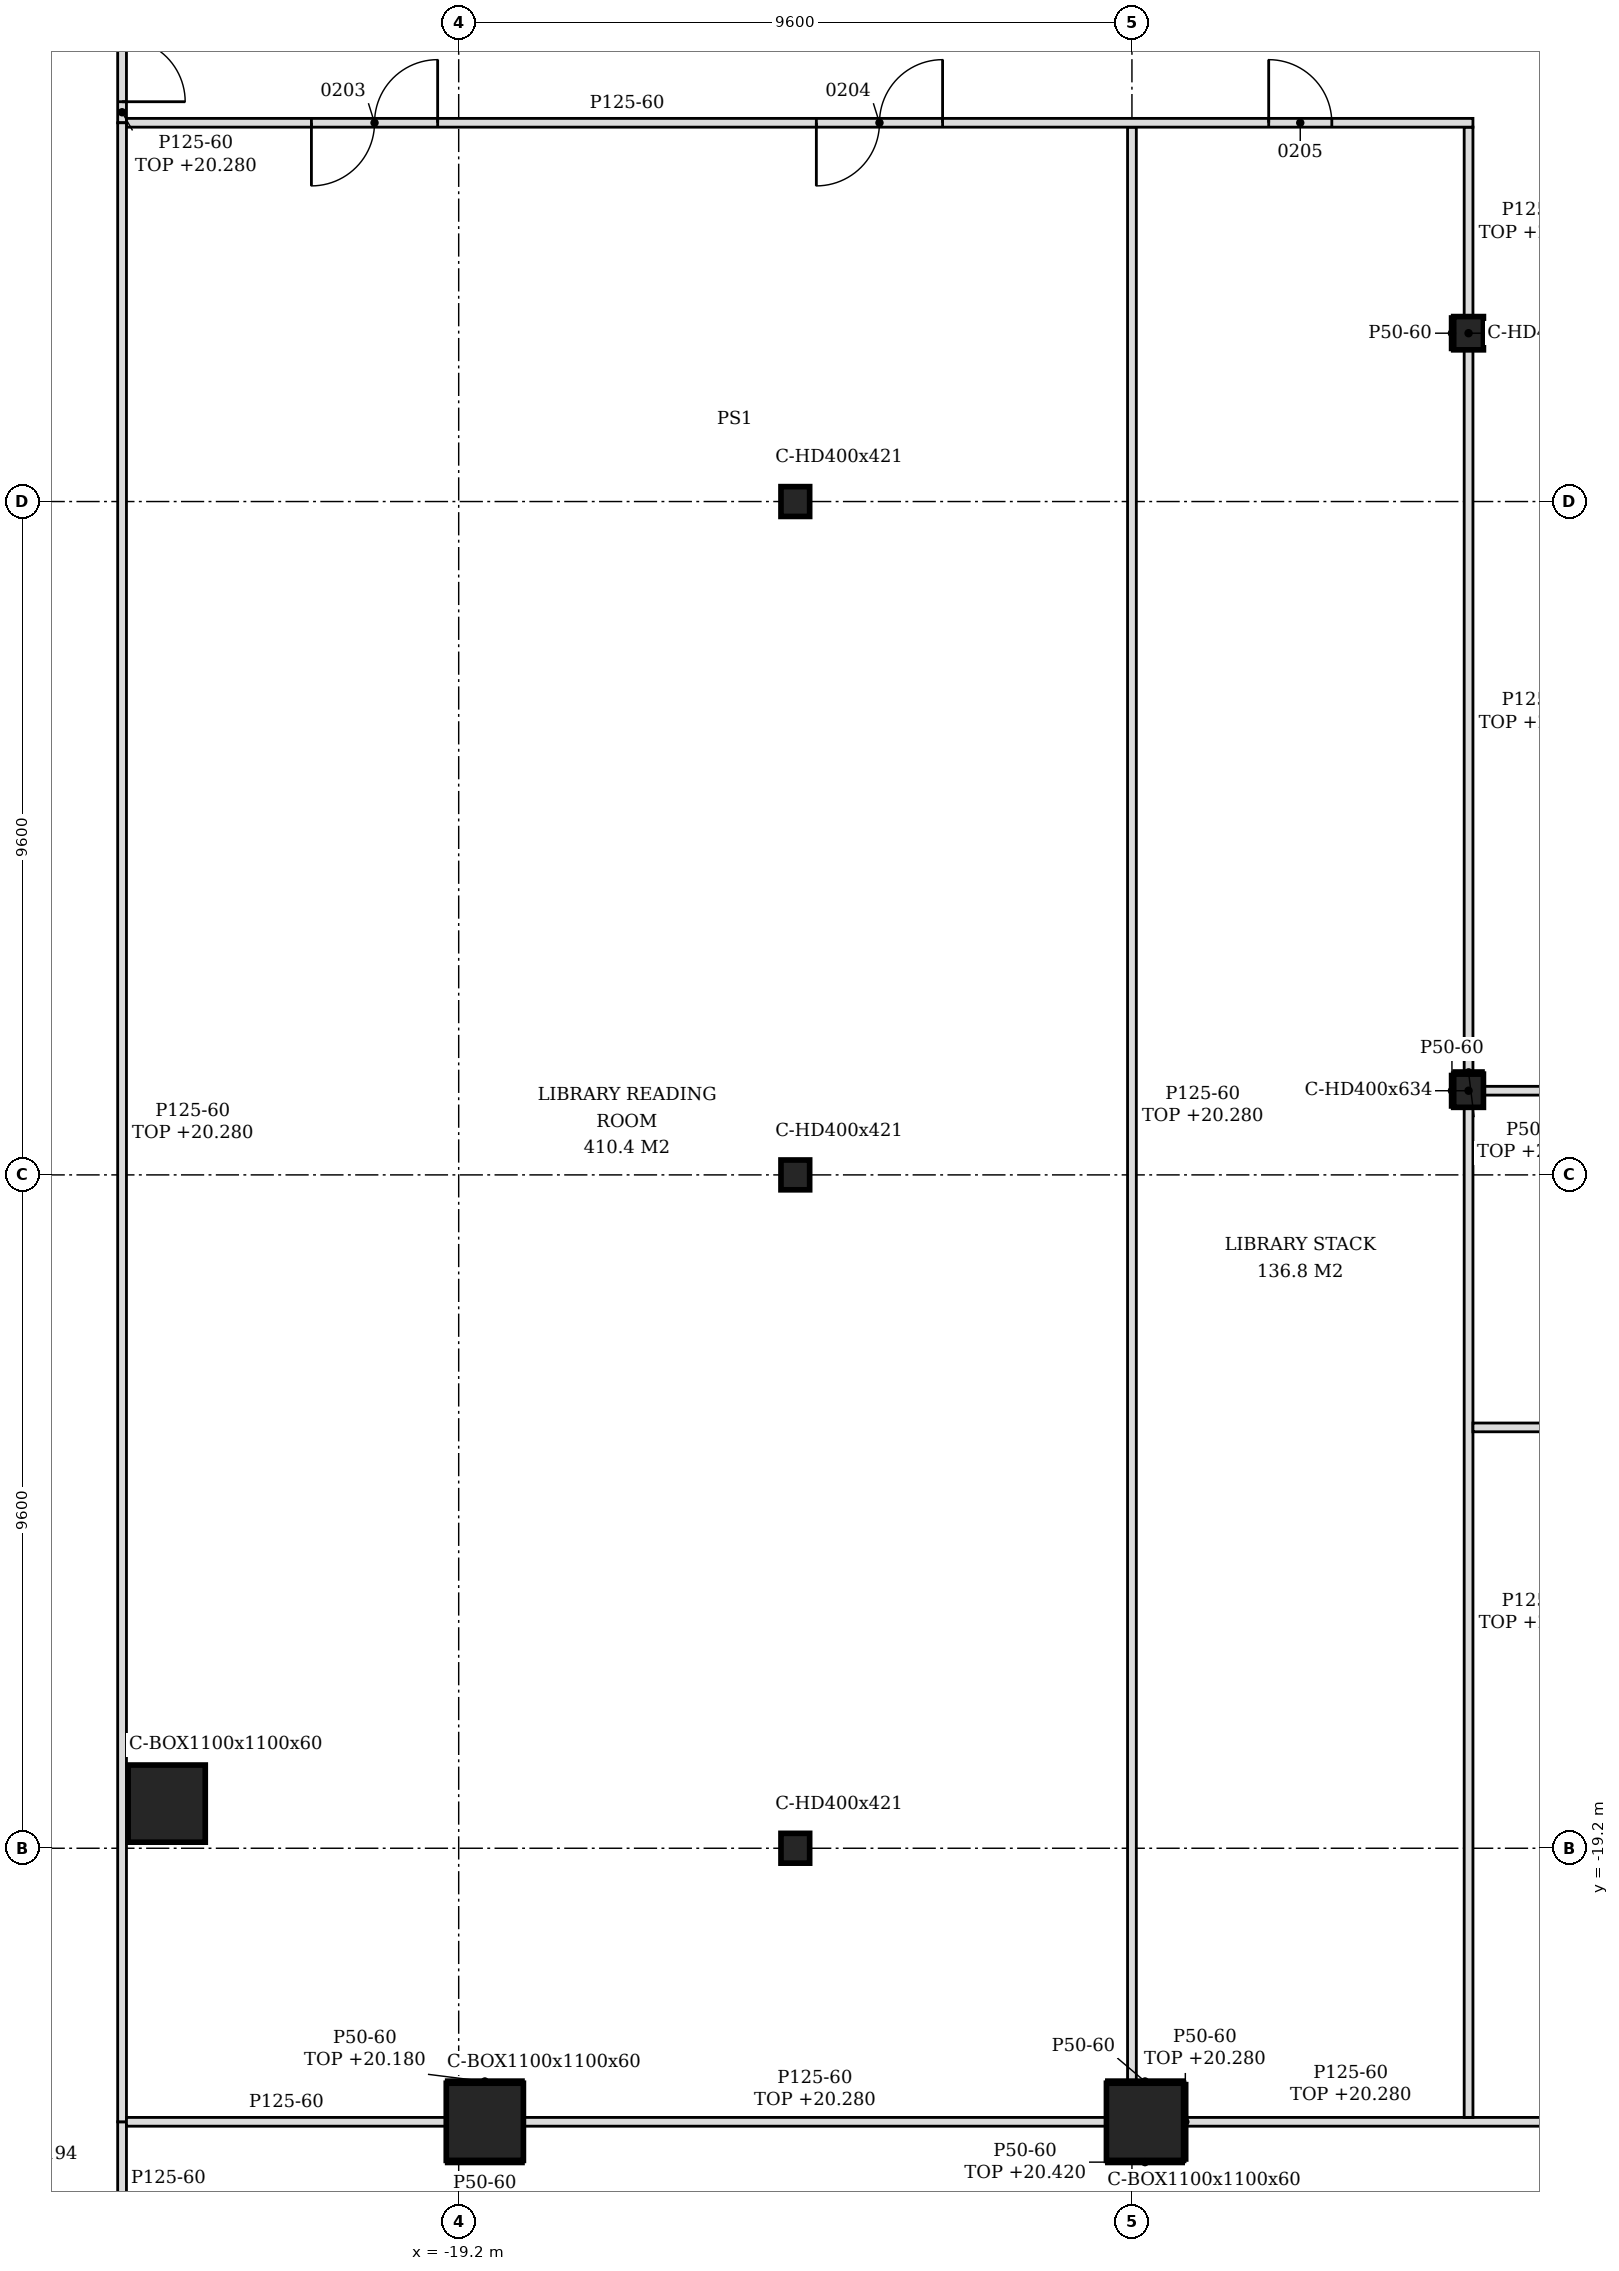
"""IFC4 building model, lengths in metres.
Left out: names, types, materials, properties, quantities, classifications, styles, units other than length and angle.
Written with IfcOpenShell. Run it as: python <this file> out.ifc"""

import sys

from ifc_helpers import new_model, si_unit, direction, frame, frame_2d, origin, origin_2d, place, context, subcontext, project, spatial, polyline, rectangle, hollow_rectangle, i_section, outline, extrude, element, fill, save


model = new_model("IFC4")
c1 = context("Model", 3, precision=1e-05, world=origin(), true_north=direction((0.0, 1.0)))
c2 = subcontext(c1, "Body", "Model", "MODEL_VIEW")
j1 = project(units=[si_unit("LENGTHUNIT", "METRE"), si_unit("PLANEANGLEUNIT", "RADIAN")], contexts=[c1])
p1 = place(None, origin())
s1 = spatial("IfcSite", under=j1, at=p1, CompositionType="ELEMENT")
p2 = place(p1, origin())
s2 = spatial("IfcBuilding", under=s1, at=p2, CompositionType="ELEMENT")
p3 = place(p2, frame((0.0, 0.0, 15.0)))
s3 = spatial("IfcBuildingStorey", under=s2, at=p3, CompositionType="ELEMENT", Elevation=15.0)
for number, where, z_axis, x_axis in (
    (1, (-18.827, -23.1, -0.2), (0.0, 0.0, 1.0), (1.0, 0.0, 0.0)),
    (2, (-9.414, -23.1, -0.2), (0.0, 0.0, 1.0), (1.0, 0.0, 0.0)),
    (3, (-23.364, -18.564, -0.2), (0.0, 0.0, 1.0), (1.0, 0.0, 0.0)),
):
    element("IfcColumn", number, at=place(p3, frame(where, z_axis=z_axis, x_axis=x_axis)), inside=s3, PredefinedType="COLUMN", context=c2, shape_type="SweptSolid", body=[
        extrude(hollow_rectangle(XDim=1.1, YDim=1.1, WallThickness=0.06, at=origin_2d()), origin(), (0.0, 0.0, 1.0), 6.0),
    ])
for number, where, z_axis, x_axis in (
    (4, (-4.8, -8.4, -0.2), (0.0, 0.0, 1.0), (1.0, 0.0, 0.0)),
    (5, (-4.8, 2.4, -0.2), (0.0, 0.0, 1.0), (1.0, 0.0, 0.0)),
):
    element("IfcColumn", number, at=place(p3, frame(where, z_axis=z_axis, x_axis=x_axis)), inside=s3, PredefinedType="COLUMN", context=c2, shape_type="SweptSolid", body=[
        extrude(i_section(OverallWidth=0.424, OverallDepth=0.474, WebThickness=0.048, FlangeThickness=0.077, FilletRadius=0.015, at=origin_2d()), origin(), (0.0, 0.0, 1.0), 6.0),
    ])
for number, where, z_axis, x_axis in (
    (6, (-14.4, -19.2, -0.2), (0.0, 0.0, 1.0), (1.0, 0.0, 0.0)),
    (7, (-14.4, -9.6, -0.2), (0.0, 0.0, 1.0), (1.0, 0.0, 0.0)),
    (8, (-14.4, 0.0, -0.2), (0.0, 0.0, 1.0), (1.0, 0.0, 0.0)),
):
    element("IfcColumn", number, at=place(p3, frame(where, z_axis=z_axis, x_axis=x_axis)), inside=s3, PredefinedType="COLUMN", context=c2, shape_type="SweptSolid", body=[
        extrude(i_section(OverallWidth=0.409, OverallDepth=0.425, WebThickness=0.033, FlangeThickness=0.052, FilletRadius=0.015, at=origin_2d()), origin(), (0.0, 0.0, 1.0), 6.0),
    ])
p4 = place(p3, frame((-24.0, -24.7, 0.0), z_axis=(0.0, 0.0, 1.0), x_axis=(0.0, 1.0, 0.0)))
e9 = element("IfcWall", 9, at=p4, inside=s3, PredefinedType="PARTITIONING", context=c2, shape_type="SweptSolid", body=[
    extrude(rectangle(XDim=1.6, YDim=0.125, at=frame_2d((0.8, 0.0))), origin(), (0.0, 0.0, 1.0), 5.8),
])
p5 = place(p3, frame((-24.0, -23.1, 0.0), z_axis=(0.0, 0.0, 1.0), x_axis=(0.0, 1.0, 0.0)))
e10 = element("IfcWall", 10, at=p5, inside=s3, PredefinedType="PARTITIONING", context=c2, shape_type="SweptSolid", body=[
    extrude(outline(polyline([(0.0, 0.0), (28.5, 0.0), (28.5, 5.28), (23.25, 5.28), (23.248, 5.08), (22.95, 5.08), (22.948, 5.28), (13.65, 5.28), (13.648, 5.08), (13.35, 5.08), (13.348, 5.28), (4.05, 5.28), (4.048, 5.18), (3.75, 5.18), (3.748, 5.28), (0.0, 5.28), (0.0, 0.0)])), frame((0.0, 0.062, 0.0), z_axis=(0.0, -1.0, 0.0), x_axis=(1.0, 0.0, 0.0)), (0.0, 0.0, 1.0), 0.125),
])
p6 = place(p3, frame((-23.938, -23.1, 0.0), z_axis=(0.0, 0.0, 1.0), x_axis=(1.0, 0.0, 0.0)))
e11 = element("IfcWall", 11, at=p6, inside=s3, PredefinedType="PARTITIONING", context=c2, shape_type="SweptSolid", body=[
    extrude(rectangle(XDim=4.56, YDim=0.125, at=frame_2d((2.28, 0.0))), origin(), (0.0, 0.0, 1.0), 5.8),
])
p7 = place(p3, frame((-18.277, -23.1, 0.0), z_axis=(0.0, 0.0, 1.0), x_axis=(1.0, 0.0, 0.0)))
e12 = element("IfcWall", 12, at=p7, inside=s3, PredefinedType="PARTITIONING", context=c2, shape_type="SweptSolid", body=[
    extrude(rectangle(XDim=8.313, YDim=0.125, at=frame_2d((4.157, 0.0))), origin(), (0.0, 0.0, 1.0), 5.28),
])
p8 = place(p3, frame((-8.864, -23.1, 0.0), z_axis=(0.0, 0.0, 1.0), x_axis=(1.0, 0.0, 0.0)))
e13 = element("IfcWall", 13, at=p8, inside=s3, PredefinedType="PARTITIONING", context=c2, shape_type="SweptSolid", body=[
    extrude(rectangle(XDim=8.313, YDim=0.125, at=frame_2d((4.157, 0.0))), origin(), (0.0, 0.0, 1.0), 5.28),
])
p9 = place(p8, frame((6.614, 0.0, 0.0)))
e14 = element("IfcOpeningElement", 14, at=p9, cuts=e13, PredefinedType="OPENING", context=c2, shape_type="SweptSolid", body=[
    extrude(rectangle(XDim=0.9, YDim=2.1, at=frame_2d((0.45, 1.05))), frame((0.0, 0.073, 0.0), z_axis=(0.0, -1.0, 0.0), x_axis=(1.0, 0.0, 0.0)), (0.0, 0.0, 1.0), 0.145),
])
p10 = place(p3, frame((-4.8, -23.038, 0.0), z_axis=(0.0, 0.0, 1.0), x_axis=(0.0, 1.0, 0.0)))
e15 = element("IfcWall", 15, at=p10, inside=s3, PredefinedType="PARTITIONING", context=c2, shape_type="SweptSolid", body=[
    extrude(rectangle(XDim=14.401, YDim=0.125, at=frame_2d((7.2, 0.0))), origin(), (0.0, 0.0, 1.0), 5.18),
])
p11 = place(p3, frame((-9.6, -22.55, 0.0), z_axis=(0.0, 0.0, 1.0), x_axis=(0.0, 1.0, 0.0)))
e16 = element("IfcWall", 16, at=p11, inside=s3, PredefinedType="PARTITIONING", context=c2, shape_type="SweptSolid", body=[
    extrude(rectangle(XDim=27.887, YDim=0.125, at=frame_2d((13.944, 0.0))), origin(), (0.0, 0.0, 1.0), 5.28),
])
p12 = place(p3, frame((-4.738, -13.2, 0.0), z_axis=(0.0, 0.0, 1.0), x_axis=(1.0, 0.0, 0.0)))
e17 = element("IfcWall", 17, at=p12, inside=s3, PredefinedType="PARTITIONING", context=c2, shape_type="SweptSolid", body=[
    extrude(outline(polyline([(0.0, 0.0), (23.875, 0.0), (23.875, 5.18), (23.788, 5.18), (23.785, 5.8), (19.288, 5.8), (19.285, 5.18), (18.988, 5.18), (18.986, 5.8), (14.488, 5.8), (14.486, 5.18), (14.188, 5.18), (14.186, 5.8), (9.688, 5.8), (9.686, 5.18), (9.387, 5.18), (9.385, 5.8), (4.887, 5.8), (4.885, 5.18), (4.587, 5.18), (4.585, 5.8), (0.087, 5.8), (0.085, 5.18), (0.0, 5.18), (0.0, 0.0)])), frame((0.0, 0.062, 0.0), z_axis=(0.0, -1.0, 0.0), x_axis=(1.0, 0.0, 0.0)), (0.0, 0.0, 1.0), 0.125),
])
p13 = place(p3, frame((-4.588, -8.4, 0.0), z_axis=(0.0, 0.0, 1.0), x_axis=(1.0, 0.0, 0.0)))
e18 = element("IfcWall", 18, at=p13, inside=s3, PredefinedType="PARTITIONING", context=c2, shape_type="SweptSolid", body=[
    extrude(rectangle(XDim=11.576, YDim=0.125, at=frame_2d((5.788, 0.0))), origin(), (0.0, 0.0, 1.0), 5.18),
])
p14 = place(p13, frame((5.388, 0.0, 0.0)))
e19 = element("IfcOpeningElement", 19, at=p14, cuts=e18, PredefinedType="OPENING", context=c2, shape_type="SweptSolid", body=[
    extrude(rectangle(XDim=0.8, YDim=2.1, at=frame_2d((0.4, 1.05))), frame((0.0, 0.073, 0.0), z_axis=(0.0, -1.0, 0.0), x_axis=(1.0, 0.0, 0.0)), (0.0, 0.0, 1.0), 0.145),
])
p15 = place(p3, frame((-4.8, -8.163, 0.0), z_axis=(0.0, 0.0, 1.0), x_axis=(0.0, 1.0, 0.0)))
e20 = element("IfcWall", 20, at=p15, inside=s3, PredefinedType="PARTITIONING", context=c2, shape_type="SweptSolid", body=[
    extrude(rectangle(XDim=10.326, YDim=0.125, at=frame_2d((5.163, 0.0))), origin(), (0.0, 0.0, 1.0), 5.18),
])
p16 = place(p3, frame((-4.8, 2.637, 0.0), z_axis=(0.0, 0.0, 1.0), x_axis=(0.0, 1.0, 0.0)))
e21 = element("IfcWall", 21, at=p16, inside=s3, PredefinedType="PARTITIONING", context=c2, shape_type="SweptSolid", body=[
    extrude(rectangle(XDim=2.7, YDim=0.125, at=frame_2d((1.35, 0.0))), origin(), (0.0, 0.0, 1.0), 5.18),
])
p17 = place(p3, frame((-24.0, 5.4, 0.0), z_axis=(0.0, 0.0, 1.0), x_axis=(0.0, 1.0, 0.0)))
e22 = element("IfcWall", 22, at=p17, inside=s3, PredefinedType="PARTITIONING", context=c2, shape_type="SweptSolid", body=[
    extrude(rectangle(XDim=2.4, YDim=0.125, at=frame_2d((1.2, 0.0))), origin(), (0.0, 0.0, 1.0), 5.28),
])
p18 = place(p17, frame((0.3, 0.0, 0.0)))
e23 = element("IfcOpeningElement", 23, at=p18, cuts=e22, PredefinedType="OPENING", context=c2, shape_type="SweptSolid", body=[
    extrude(rectangle(XDim=1.8, YDim=2.1, at=frame_2d((0.9, 1.05))), frame((0.0, 0.073, 0.0), z_axis=(0.0, -1.0, 0.0), x_axis=(1.0, 0.0, 0.0)), (0.0, 0.0, 1.0), 0.145),
])
p19 = place(p3, frame((-23.938, 5.4, 0.0), z_axis=(0.0, 0.0, 1.0), x_axis=(1.0, 0.0, 0.0)))
e24 = element("IfcWall", 24, at=p19, inside=s3, PredefinedType="PARTITIONING", context=c2, shape_type="SweptSolid", body=[
    extrude(outline(polyline([(0.0, 0.0), (19.2, 0.0), (19.2, 5.18), (18.988, 5.18), (18.986, 5.8), (14.438, 5.8), (14.436, 5.28), (14.238, 5.28), (14.236, 5.8), (9.637, 5.8), (9.635, 5.28), (9.438, 5.28), (9.436, 5.8), (4.837, 5.8), (4.835, 5.28), (4.637, 5.28), (4.635, 5.8), (0.038, 5.8), (0.035, 5.28), (0.0, 5.28), (0.0, 0.0)])), frame((0.0, 0.062, 0.0), z_axis=(0.0, -1.0, 0.0), x_axis=(1.0, 0.0, 0.0)), (0.0, 0.0, 1.0), 0.125),
])
p20 = place(p19, frame((2.637, 0.0, 0.0)))
e25 = element("IfcOpeningElement", 25, at=p20, cuts=e24, PredefinedType="OPENING", context=c2, shape_type="SweptSolid", body=[
    extrude(rectangle(XDim=1.8, YDim=2.1, at=frame_2d((0.9, 1.05))), frame((0.0, 0.073, 0.0), z_axis=(0.0, -1.0, 0.0), x_axis=(1.0, 0.0, 0.0)), (0.0, 0.0, 1.0), 0.145),
])
p21 = place(p19, frame((9.837, 0.0, 0.0)))
e26 = element("IfcOpeningElement", 26, at=p21, cuts=e24, PredefinedType="OPENING", context=c2, shape_type="SweptSolid", body=[
    extrude(rectangle(XDim=1.8, YDim=2.1, at=frame_2d((0.9, 1.05))), frame((0.0, 0.073, 0.0), z_axis=(0.0, -1.0, 0.0), x_axis=(1.0, 0.0, 0.0)), (0.0, 0.0, 1.0), 0.145),
])
p22 = place(p19, frame((16.288, 0.0, 0.0)))
e27 = element("IfcOpeningElement", 27, at=p22, cuts=e24, PredefinedType="OPENING", context=c2, shape_type="SweptSolid", body=[
    extrude(rectangle(XDim=0.9, YDim=2.1, at=frame_2d((0.45, 1.05))), frame((0.0, 0.073, 0.0), z_axis=(0.0, -1.0, 0.0), x_axis=(1.0, 0.0, 0.0)), (0.0, 0.0, 1.0), 0.145),
])
p23 = place(p3, frame((-19.377, -22.525, 0.0), z_axis=(0.0, 0.0, 1.0), x_axis=(1.0, 0.0, 0.0)))
e28 = element("IfcWall", 28, at=p23, inside=s3, PredefinedType="PARTITIONING", context=c2, shape_type="SweptSolid", body=[
    extrude(rectangle(XDim=1.1, YDim=0.05, at=frame_2d((0.55, 0.0))), origin(), (0.0, 0.0, 1.0), 5.18),
])
p24 = place(p3, frame((-19.377, -23.675, 0.0), z_axis=(0.0, 0.0, 1.0), x_axis=(1.0, 0.0, 0.0)))
e29 = element("IfcWall", 29, at=p24, inside=s3, PredefinedType="PARTITIONING", context=c2, shape_type="SweptSolid", body=[
    extrude(rectangle(XDim=1.1, YDim=0.05, at=frame_2d((0.55, 0.0))), origin(), (0.0, 0.0, 1.0), 5.42),
])
p25 = place(p3, frame((-9.964, -22.525, 0.0), z_axis=(0.0, 0.0, 1.0), x_axis=(1.0, 0.0, 0.0)))
e30 = element("IfcWall", 30, at=p25, inside=s3, PredefinedType="PARTITIONING", context=c2, shape_type="SweptSolid", body=[
    extrude(rectangle(XDim=1.1, YDim=0.05, at=frame_2d((0.55, 0.0))), origin(), (0.0, 0.0, 1.0), 5.8),
])
p26 = place(p3, frame((-9.964, -23.675, 0.0), z_axis=(0.0, 0.0, 1.0), x_axis=(1.0, 0.0, 0.0)))
e31 = element("IfcWall", 31, at=p26, inside=s3, PredefinedType="PARTITIONING", context=c2, shape_type="SweptSolid", body=[
    extrude(rectangle(XDim=1.1, YDim=0.05, at=frame_2d((0.55, 0.0))), origin(), (0.0, 0.0, 1.0), 5.42),
])
p27 = place(p3, frame((-8.839, -23.65, 0.0), z_axis=(0.0, 0.0, 1.0), x_axis=(0.0, 1.0, 0.0)))
e32 = element("IfcWall", 32, at=p27, inside=s3, PredefinedType="PARTITIONING", context=c2, shape_type="SweptSolid", body=[
    extrude(rectangle(XDim=1.1, YDim=0.05, at=frame_2d((0.55, 0.0))), origin(), (0.0, 0.0, 1.0), 5.28),
])
for number, where, z_axis, x_axis in (
    (33, (-5.037, -8.637, 0.0), (0.0, 0.0, 1.0), (0.0, 1.0, 0.0)),
    (34, (-5.037, 2.163, 0.0), (0.0, 0.0, 1.0), (0.0, 1.0, 0.0)),
):
    element("IfcWall", number, at=place(p3, frame(where, z_axis=z_axis, x_axis=x_axis)), inside=s3, PredefinedType="PARTITIONING", context=c2, shape_type="SweptSolid", body=[
        extrude(rectangle(XDim=0.474, YDim=0.05, at=frame_2d((0.237, 0.0))), origin(), (0.0, 0.0, 1.0), 5.8),
    ])
p28 = place(p3, frame((-5.012, -8.138, 0.0), z_axis=(0.0, 0.0, 1.0), x_axis=(1.0, 0.0, 0.0)))
e35 = element("IfcWall", 35, at=p28, inside=s3, PredefinedType="PARTITIONING", context=c2, shape_type="SweptSolid", body=[
    extrude(rectangle(XDim=0.424, YDim=0.05, at=frame_2d((0.212, 0.0))), origin(), (0.0, 0.0, 1.0), 5.18),
])
p29 = place(p18, frame((1.8, 0.0, 0.0), z_axis=(0.0, 0.0, 1.0), x_axis=(-1.0, 0.0, 0.0)))
e36 = element("IfcDoor", 36, at=p29, inside=s3, OperationType="DOUBLE_DOOR_SINGLE_SWING", PredefinedType="DOOR", context=c2, shape_type="SweptSolid", body=[
    extrude(rectangle(XDim=1.8, YDim=2.1, at=frame_2d((0.9, 1.05))), frame((0.0, 0.025, 0.0), z_axis=(0.0, -1.0, 0.0), x_axis=(1.0, 0.0, 0.0)), (0.0, 0.0, 1.0), 0.05),
])
fill(e23, e36)
p30 = place(p20, origin())
e37 = element("IfcDoor", 37, at=p30, inside=s3, OperationType="DOUBLE_DOOR_SINGLE_SWING", PredefinedType="DOOR", context=c2, shape_type="SweptSolid", body=[
    extrude(rectangle(XDim=1.8, YDim=2.1, at=frame_2d((0.9, 1.05))), frame((0.0, 0.025, 0.0), z_axis=(0.0, -1.0, 0.0), x_axis=(1.0, 0.0, 0.0)), (0.0, 0.0, 1.0), 0.05),
])
fill(e25, e37)
p31 = place(p21, origin())
e38 = element("IfcDoor", 38, at=p31, inside=s3, OperationType="DOUBLE_DOOR_SINGLE_SWING", PredefinedType="DOOR", context=c2, shape_type="SweptSolid", body=[
    extrude(rectangle(XDim=1.8, YDim=2.1, at=frame_2d((0.9, 1.05))), frame((0.0, 0.025, 0.0), z_axis=(0.0, -1.0, 0.0), x_axis=(1.0, 0.0, 0.0)), (0.0, 0.0, 1.0), 0.05),
])
fill(e26, e38)
p32 = place(p22, origin())
e39 = element("IfcDoor", 39, at=p32, inside=s3, OperationType="SINGLE_SWING_LEFT", PredefinedType="DOOR", context=c2, shape_type="SweptSolid", body=[
    extrude(rectangle(XDim=0.9, YDim=2.1, at=frame_2d((0.45, 1.05))), frame((0.0, 0.025, 0.0), z_axis=(0.0, -1.0, 0.0), x_axis=(1.0, 0.0, 0.0)), (0.0, 0.0, 1.0), 0.05),
])
fill(e27, e39)
save(model, sys.argv[1])
